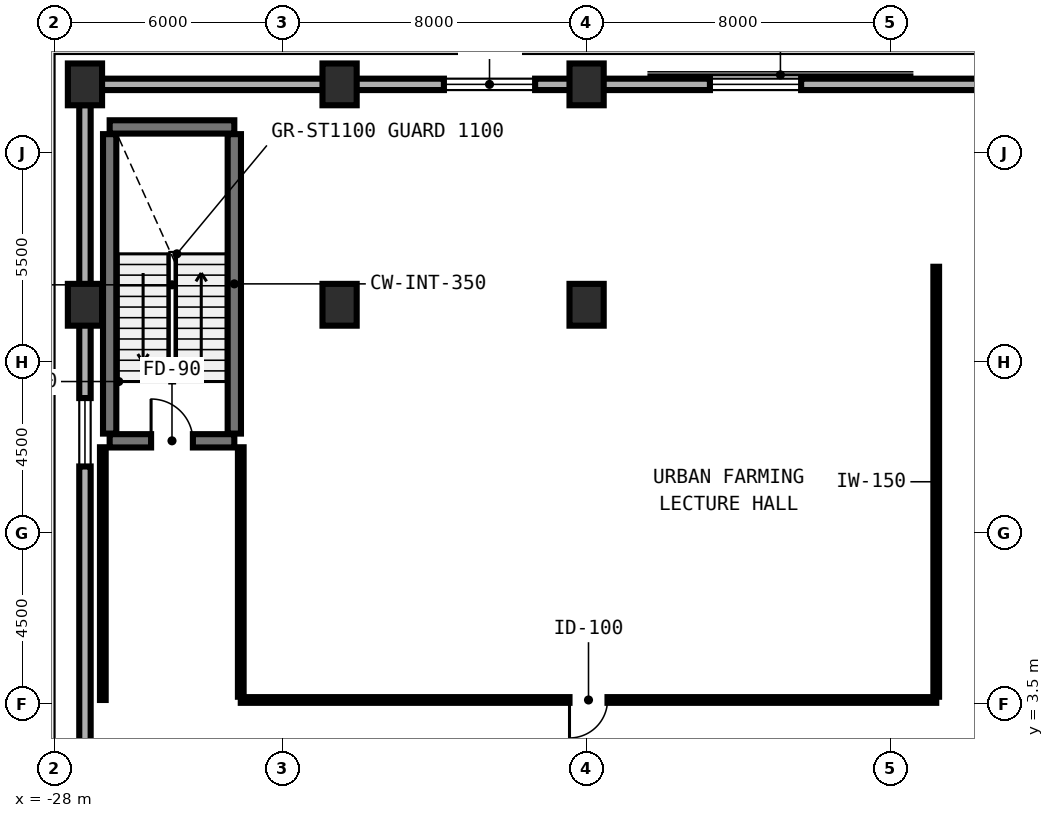
"""IFC4 building model, lengths in metres.
Left out: names, types, materials, properties, quantities, classifications, styles, units other than length and angle.
Written with IfcOpenShell. Run it as: python <this file> out.ifc"""

import sys

from ifc_helpers import new_model, si_unit, direction, frame, frame_2d, origin, origin_2d, place, context, subcontext, project, spatial, rectangle, extrude, element, fill, save


model = new_model("IFC4")
c1 = context("Model", 3, precision=1e-05, world=origin(), true_north=direction((0.0, 1.0)))
c2 = subcontext(c1, "Body", "Model", "MODEL_VIEW")
j1 = project(units=[si_unit("LENGTHUNIT", "METRE"), si_unit("PLANEANGLEUNIT", "RADIAN")], contexts=[c1])
p1 = place(None, origin())
s1 = spatial("IfcSite", under=j1, at=p1, CompositionType="ELEMENT")
p2 = place(p1, origin())
s2 = spatial("IfcBuilding", under=s1, at=p2, CompositionType="ELEMENT")
p3 = place(p2, frame((0.0, 0.0, 18.4)))
s3 = spatial("IfcBuildingStorey", under=s2, at=p3, CompositionType="ELEMENT", Elevation=18.4)
p4 = place(p3, frame((-26.55, 10.42, 0.0), z_axis=(0.0, 0.0, 1.0), x_axis=(1.0, 0.0, 0.0)))
e1 = element("IfcWall", 1, at=p4, inside=s3, PredefinedType="SHEAR", context=c2, shape_type="SweptSolid", body=[
    extrude(rectangle(XDim=3.28, YDim=0.35, at=frame_2d((1.64, 0.0))), origin(), (0.0, 0.0, 1.0), 4.592),
])
p5 = place(p4, frame((1.09, 0.0, 0.0)))
e2 = element("IfcOpeningElement", 2, at=p5, cuts=e1, PredefinedType="OPENING", context=c2, shape_type="SweptSolid", body=[
    extrude(rectangle(XDim=1.1, YDim=2.15, at=frame_2d((0.55, 1.075))), frame((0.0, 0.185, 0.0), z_axis=(0.0, -1.0, 0.0), x_axis=(1.0, 0.0, 0.0)), (0.0, 0.0, 1.0), 0.37),
])
p6 = place(p3, frame((-26.55, 18.68, 0.0), z_axis=(0.0, 0.0, 1.0), x_axis=(1.0, 0.0, 0.0)))
e3 = element("IfcWall", 3, at=p6, inside=s3, PredefinedType="SHEAR", context=c2, shape_type="SweptSolid", body=[
    extrude(rectangle(XDim=3.28, YDim=0.35, at=frame_2d((1.64, 0.0))), origin(), (0.0, 0.0, 1.0), 4.592),
])
for number, where, z_axis, x_axis in (
    (4, (-26.55, 10.61, 0.0), (0.0, 0.0, 1.0), (0.0, 1.0, 0.0)),
    (5, (-23.27, 10.61, 0.0), (0.0, 0.0, 1.0), (0.0, 1.0, 0.0)),
):
    element("IfcWall", number, at=place(p3, frame(where, z_axis=z_axis, x_axis=x_axis)), inside=s3, PredefinedType="SHEAR", context=c2, shape_type="SweptSolid", body=[
        extrude(rectangle(XDim=7.88, YDim=0.35, at=frame_2d((3.94, 0.0))), origin(), (0.0, 0.0, 1.0), 4.592),
    ])
for number, where, z_axis, x_axis in (
    (6, (-27.2, 14.0, 0.0), (0.0, 0.0, 1.0), (1.0, 0.0, 0.0)),
    (7, (-27.2, 19.8, 0.0), (0.0, 0.0, 1.0), (1.0, 0.0, 0.0)),
    (8, (-20.5, 14.0, 0.0), (0.0, 0.0, 1.0), (1.0, 0.0, 0.0)),
    (9, (-20.5, 19.8, 0.0), (0.0, 0.0, 1.0), (1.0, 0.0, 0.0)),
    (10, (-14.0, 14.0, 0.0), (0.0, 0.0, 1.0), (1.0, 0.0, 0.0)),
    (11, (-14.0, 19.8, 0.0), (0.0, 0.0, 1.0), (1.0, 0.0, 0.0)),
):
    element("IfcColumn", number, at=place(p3, frame(where, z_axis=z_axis, x_axis=x_axis)), inside=s3, PredefinedType="COLUMN", context=c2, shape_type="SweptSolid", body=[
        extrude(rectangle(XDim=0.9, YDim=1.1, at=origin_2d()), origin(), (0.0, 0.0, 1.0), 4.575),
    ])
p7 = place(p3, frame((-27.2, -19.255, 0.0), z_axis=(0.0, 0.0, 1.0), x_axis=(0.0, 1.0, 0.0)))
e12 = element("IfcWall", 12, at=p7, inside=s3, PredefinedType="SOLIDWALL", context=c2, shape_type="SweptSolid", body=[
    extrude(rectangle(XDim=38.51, YDim=0.3, at=frame_2d((19.255, 0.0))), origin(), (0.0, 0.0, 1.0), 3.35),
])
p8 = place(p7, frame((9.0, 0.0, 0.85)))
e13 = element("IfcOpeningElement", 13, at=p8, cuts=e12, PredefinedType="OPENING", context=c2, shape_type="SweptSolid", body=[
    extrude(rectangle(XDim=1.8, YDim=1.9, at=frame_2d((0.9, 0.95))), frame((0.0, 0.16, 0.0), z_axis=(0.0, -1.0, 0.0), x_axis=(1.0, 0.0, 0.0)), (0.0, 0.0, 1.0), 0.32),
])
p9 = place(p7, frame((16.0, 0.0, 0.85)))
e14 = element("IfcOpeningElement", 14, at=p9, cuts=e12, PredefinedType="OPENING", context=c2, shape_type="SweptSolid", body=[
    extrude(rectangle(XDim=1.8, YDim=1.9, at=frame_2d((0.9, 0.95))), frame((0.0, 0.16, 0.0), z_axis=(0.0, -1.0, 0.0), x_axis=(1.0, 0.0, 0.0)), (0.0, 0.0, 1.0), 0.32),
])
p10 = place(p7, frame((29.0, 0.0, 0.85)))
e15 = element("IfcOpeningElement", 15, at=p10, cuts=e12, PredefinedType="OPENING", context=c2, shape_type="SweptSolid", body=[
    extrude(rectangle(XDim=1.8, YDim=1.9, at=frame_2d((0.9, 0.95))), frame((0.0, 0.16, 0.0), z_axis=(0.0, -1.0, 0.0), x_axis=(1.0, 0.0, 0.0)), (0.0, 0.0, 1.0), 0.32),
])
p11 = place(p3, frame((-26.755, 19.8, 0.0), z_axis=(0.0, 0.0, 1.0), x_axis=(1.0, 0.0, 0.0)))
e16 = element("IfcWall", 16, at=p11, inside=s3, PredefinedType="SOLIDWALL", context=c2, shape_type="SweptSolid", body=[
    extrude(rectangle(XDim=53.51, YDim=0.3, at=frame_2d((26.755, 0.0))), origin(), (0.0, 0.0, 1.0), 3.35),
])
p12 = place(p11, frame((9.0, 0.0, 0.85)))
e17 = element("IfcOpeningElement", 17, at=p12, cuts=e16, PredefinedType="OPENING", context=c2, shape_type="SweptSolid", body=[
    extrude(rectangle(XDim=2.4, YDim=1.9, at=frame_2d((1.2, 0.95))), frame((0.0, 0.16, 0.0), z_axis=(0.0, -1.0, 0.0), x_axis=(1.0, 0.0, 0.0)), (0.0, 0.0, 1.0), 0.32),
])
p13 = place(p11, frame((16.0, 0.0, 0.85)))
e18 = element("IfcOpeningElement", 18, at=p13, cuts=e16, PredefinedType="OPENING", context=c2, shape_type="SweptSolid", body=[
    extrude(rectangle(XDim=2.4, YDim=1.9, at=frame_2d((1.2, 0.95))), frame((0.0, 0.16, 0.0), z_axis=(0.0, -1.0, 0.0), x_axis=(1.0, 0.0, 0.0)), (0.0, 0.0, 1.0), 0.32),
])
p14 = place(p11, frame((29.0, 0.0, 0.85)))
e19 = element("IfcOpeningElement", 19, at=p14, cuts=e16, PredefinedType="OPENING", context=c2, shape_type="SweptSolid", body=[
    extrude(rectangle(XDim=2.4, YDim=1.9, at=frame_2d((1.2, 0.95))), frame((0.0, 0.16, 0.0), z_axis=(0.0, -1.0, 0.0), x_axis=(1.0, 0.0, 0.0)), (0.0, 0.0, 1.0), 0.32),
])
p15 = place(p3, frame((-4.8, 3.6, 0.0), z_axis=(0.0, 0.0, 1.0), x_axis=(-1.0, 0.0, 0.0)))
e20 = element("IfcWall", 20, at=p15, inside=s3, PredefinedType="PARTITIONING", context=c2, shape_type="SweptSolid", body=[
    extrude(rectangle(XDim=18.3, YDim=0.15, at=frame_2d((9.15, 0.0))), origin(), (0.0, 0.0, 1.0), 4.28),
])
p16 = place(p15, frame((8.65, 0.0, 0.0)))
e21 = element("IfcOpeningElement", 21, at=p16, cuts=e20, PredefinedType="OPENING", context=c2, shape_type="SweptSolid", body=[
    extrude(rectangle(XDim=1.0, YDim=2.1, at=frame_2d((0.5, 1.05))), frame((0.0, 0.085, 0.0), z_axis=(0.0, -1.0, 0.0), x_axis=(1.0, 0.0, 0.0)), (0.0, 0.0, 1.0), 0.17),
])
p17 = place(p3, frame((-4.8, 15.0, 0.0), z_axis=(0.0, 0.0, 1.0), x_axis=(0.0, -1.0, 0.0)))
e22 = element("IfcWall", 22, at=p17, inside=s3, PredefinedType="PARTITIONING", context=c2, shape_type="SweptSolid", body=[
    extrude(rectangle(XDim=11.315, YDim=0.15, at=frame_2d((5.657, 0.0))), origin(), (0.0, 0.0, 1.0), 4.28),
])
p18 = place(p3, frame((-23.1, 3.685, 0.0), z_axis=(0.0, 0.0, 1.0), x_axis=(0.0, 1.0, 0.0)))
e23 = element("IfcWall", 23, at=p18, inside=s3, PredefinedType="PARTITIONING", context=c2, shape_type="SweptSolid", body=[
    extrude(rectangle(XDim=6.565, YDim=0.15, at=frame_2d((3.282, 0.0))), origin(), (0.0, 0.0, 1.0), 4.28),
])
p19 = place(p3, frame((-26.73, 10.25, 0.0), z_axis=(0.0, 0.0, 1.0), x_axis=(0.0, -1.0, 0.0)))
e24 = element("IfcWall", 24, at=p19, inside=s3, PredefinedType="PARTITIONING", context=c2, shape_type="SweptSolid", body=[
    extrude(rectangle(XDim=6.65, YDim=0.15, at=frame_2d((3.325, 0.0))), origin(), (0.0, 0.0, 1.0), 4.28),
])
p20 = place(p10, origin())
e25 = element("IfcWindow", 25, at=p20, inside=s3, PartitioningType="SINGLE_PANEL", PredefinedType="WINDOW", context=c2, shape_type="SweptSolid", body=[
    extrude(rectangle(XDim=1.8, YDim=1.9, at=frame_2d((0.9, 0.95))), frame((0.0, 0.03, 0.0), z_axis=(0.0, -1.0, 0.0), x_axis=(1.0, 0.0, 0.0)), (0.0, 0.0, 1.0), 0.06),
])
fill(e15, e25)
p21 = place(p12, origin())
e26 = element("IfcWindow", 26, at=p21, inside=s3, PartitioningType="SINGLE_PANEL", PredefinedType="WINDOW", context=c2, shape_type="SweptSolid", body=[
    extrude(rectangle(XDim=2.4, YDim=1.9, at=frame_2d((1.2, 0.95))), frame((0.0, 0.03, 0.0), z_axis=(0.0, -1.0, 0.0), x_axis=(1.0, 0.0, 0.0)), (0.0, 0.0, 1.0), 0.06),
])
fill(e17, e26)
p22 = place(p13, origin())
e27 = element("IfcWindow", 27, at=p22, inside=s3, PartitioningType="SINGLE_PANEL", PredefinedType="WINDOW", context=c2, shape_type="SweptSolid", body=[
    extrude(rectangle(XDim=2.4, YDim=1.9, at=frame_2d((1.2, 0.95))), frame((0.0, 0.03, 0.0), z_axis=(0.0, -1.0, 0.0), x_axis=(1.0, 0.0, 0.0)), (0.0, 0.0, 1.0), 0.06),
])
fill(e18, e27)
p23 = place(p5, origin())
e28 = element("IfcDoor", 28, at=p23, inside=s3, OperationType="SINGLE_SWING_LEFT", PredefinedType="DOOR", context=c2, shape_type="SweptSolid", body=[
    extrude(rectangle(XDim=1.1, YDim=2.15, at=frame_2d((0.55, 1.075))), frame((0.0, 0.025, 0.0), z_axis=(0.0, -1.0, 0.0), x_axis=(1.0, 0.0, 0.0)), (0.0, 0.0, 1.0), 0.05),
])
fill(e2, e28)
p24 = place(p16, origin())
e29 = element("IfcDoor", 29, at=p24, inside=s3, OperationType="SINGLE_SWING_RIGHT", PredefinedType="DOOR", context=c2, shape_type="SweptSolid", body=[
    extrude(rectangle(XDim=1.0, YDim=2.1, at=frame_2d((0.5, 1.05))), frame((0.0, 0.025, 0.0), z_axis=(0.0, -1.0, 0.0), x_axis=(1.0, 0.0, 0.0)), (0.0, 0.0, 1.0), 0.05),
])
fill(e21, e29)
save(model, sys.argv[1])
